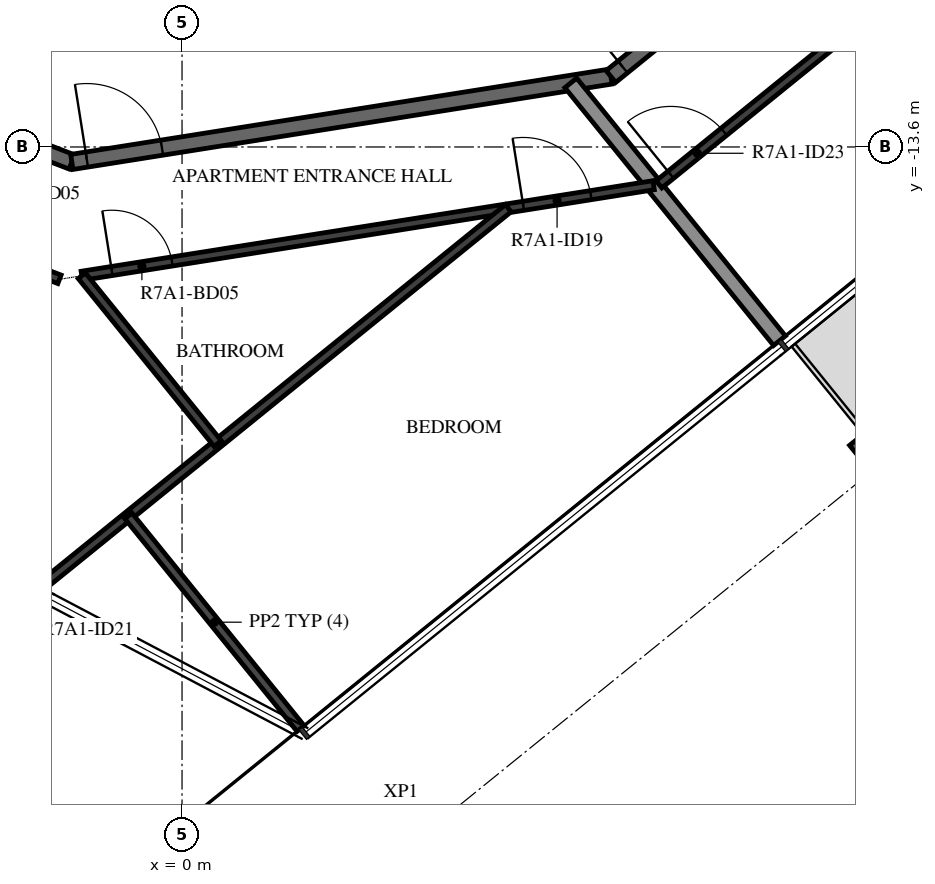
"""IFC4 building model, lengths in metres.
Left out: names, types, materials, properties, quantities, classifications, styles, units other than length and angle.
Written with IfcOpenShell. Run it as: python <this file> out.ifc"""

import sys

from ifc_helpers import new_model, si_unit, direction, frame, frame_2d, origin, origin_2d, place, context, subcontext, project, spatial, rectangle, i_section, extrude, element, fill, save


model = new_model("IFC4")
c1 = context("Model", 3, precision=1e-05, world=origin(), true_north=direction((0.0, 1.0)))
c2 = subcontext(c1, "Body", "Model", "MODEL_VIEW")
j1 = project(units=[si_unit("LENGTHUNIT", "METRE"), si_unit("PLANEANGLEUNIT", "RADIAN")], contexts=[c1])
p1 = place(None, origin())
s1 = spatial("IfcSite", under=j1, at=p1, CompositionType="ELEMENT")
p2 = place(p1, origin())
s2 = spatial("IfcBuilding", under=s1, at=p2, CompositionType="ELEMENT")
p3 = place(p2, frame((0.0, 0.0, 266.9)))
s3 = spatial("IfcBuildingStorey", under=s2, at=p3, CompositionType="ELEMENT", Elevation=266.9)
p4 = place(p3, frame((9.182, -17.781, -0.38), z_axis=(0.0, 0.0, 1.0), x_axis=(-0.777146167973, -0.629320136024, 0.0)))
e1 = element("IfcColumn", 1, at=p4, inside=s3, PredefinedType="COLUMN", context=c2, shape_type="SweptSolid", body=[
    extrude(i_section(OverallWidth=0.3, OverallDepth=0.9, WebThickness=0.019, FlangeThickness=0.035, FilletRadius=0.03, at=origin_2d()), origin(), (0.0, 0.0, 1.0), 3.5),
])
p5 = place(p3, frame((-8.154, -11.223, 0.0), z_axis=(0.0, 0.0, 1.0), x_axis=(0.93359073609, -0.358341090983, 0.0)))
e2 = element("IfcWall", 2, at=p5, inside=s3, PredefinedType="STANDARD", context=c2, shape_type="SweptSolid", body=[
    extrude(rectangle(XDim=7.181, YDim=0.2, at=frame_2d((3.59, 0.0))), origin(), (0.0, 0.0, 1.0), 3.12),
])
p6 = place(p5, frame((2.39, 0.0, 0.0)))
e3 = element("IfcOpeningElement", 3, at=p6, cuts=e2, PredefinedType="OPENING", context=c2, shape_type="SweptSolid", body=[
    extrude(rectangle(XDim=1.0, YDim=2.1, at=frame_2d((0.5, 1.05))), frame((0.0, 0.11, 0.0), z_axis=(0.0, -1.0, 0.0), x_axis=(1.0, 0.0, 0.0)), (0.0, 0.0, 1.0), 0.22),
])
p7 = place(p3, frame((-1.45, -13.797, 0.0), z_axis=(0.0, 0.0, 1.0), x_axis=(0.987690361611, 0.156421704315, 0.0)))
e4 = element("IfcWall", 4, at=p7, inside=s3, PredefinedType="STANDARD", context=c2, shape_type="SweptSolid", body=[
    extrude(rectangle(XDim=7.181, YDim=0.2, at=frame_2d((3.591, 0.0))), origin(), (0.0, 0.0, 1.0), 3.12),
])
p8 = place(p7, frame((0.2, 0.0, 0.0)))
e5 = element("IfcOpeningElement", 5, at=p8, cuts=e4, PredefinedType="OPENING", context=c2, shape_type="SweptSolid", body=[
    extrude(rectangle(XDim=1.0, YDim=2.1, at=frame_2d((0.5, 1.05))), frame((0.0, 0.11, 0.0), z_axis=(0.0, -1.0, 0.0), x_axis=(1.0, 0.0, 0.0)), (0.0, 0.0, 1.0), 0.22),
])
p9 = place(p3, frame((5.643, -12.673, 0.0), z_axis=(0.0, 0.0, 1.0), x_axis=(0.777160148113, 0.629302871585, 0.0)))
e6 = element("IfcWall", 6, at=p9, inside=s3, PredefinedType="STANDARD", context=c2, shape_type="SweptSolid", body=[
    extrude(rectangle(XDim=7.181, YDim=0.2, at=frame_2d((3.59, 0.0))), origin(), (0.0, 0.0, 1.0), 3.12),
])
p10 = place(p9, frame((0.2, 0.0, 0.0)))
e7 = element("IfcOpeningElement", 7, at=p10, cuts=e6, PredefinedType="OPENING", context=c2, shape_type="SweptSolid", body=[
    extrude(rectangle(XDim=1.0, YDim=2.1, at=frame_2d((0.5, 1.05))), frame((0.0, 0.11, 0.0), z_axis=(0.0, -1.0, 0.0), x_axis=(1.0, 0.0, 0.0)), (0.0, 0.0, 1.0), 0.22),
])
p11 = place(p3, frame((7.861, -16.148, 0.0), z_axis=(0.0, 0.0, 1.0), x_axis=(-0.629330189513, 0.777138026716, 0.0)))
e8 = element("IfcWall", 8, at=p11, inside=s3, PredefinedType="STANDARD", context=c2, shape_type="SweptSolid", body=[
    extrude(rectangle(XDim=4.364, YDim=0.2, at=frame_2d((2.182, 0.0))), origin(), (0.0, 0.0, 1.0), 2.73),
])
p12 = place(p3, frame((-9.067, -12.479, 0.0), z_axis=(0.0, 0.0, 1.0), x_axis=(0.933579449035, -0.358370495911, 0.0)))
e9 = element("IfcWall", 9, at=p12, inside=s3, PredefinedType="PARTITIONING", context=c2, shape_type="SweptSolid", body=[
    extrude(rectangle(XDim=7.985, YDim=0.12, at=frame_2d((3.992, 0.0))), origin(), (0.0, 0.0, 1.0), 3.12),
])
p13 = place(p12, frame((4.192, 0.0, 0.0)))
e10 = element("IfcOpeningElement", 10, at=p13, cuts=e9, PredefinedType="OPENING", context=c2, shape_type="SweptSolid", body=[
    extrude(rectangle(XDim=0.9, YDim=2.1, at=frame_2d((0.45, 1.05))), frame((0.0, 0.07, 0.0), z_axis=(0.0, -1.0, 0.0), x_axis=(1.0, 0.0, 0.0)), (0.0, 0.0, 1.0), 0.14),
])
p14 = place(p3, frame((-1.318, -15.294, 0.0), z_axis=(0.0, 0.0, 1.0), x_axis=(0.987689040792, 0.156430044108, 0.0)))
e11 = element("IfcWall", 11, at=p14, inside=s3, PredefinedType="PARTITIONING", context=c2, shape_type="SweptSolid", body=[
    extrude(rectangle(XDim=7.616, YDim=0.12, at=frame_2d((3.808, 0.0))), origin(), (0.0, 0.0, 1.0), 3.12),
])
p15 = place(p14, frame((0.4, 0.0, 0.0)))
e12 = element("IfcOpeningElement", 12, at=p15, cuts=e11, PredefinedType="OPENING", context=c2, shape_type="SweptSolid", body=[
    extrude(rectangle(XDim=0.8, YDim=2.1, at=frame_2d((0.4, 1.05))), frame((0.0, 0.07, 0.0), z_axis=(0.0, -1.0, 0.0), x_axis=(1.0, 0.0, 0.0)), (0.0, 0.0, 1.0), 0.14),
])
p16 = place(p14, frame((5.88, 0.0, 0.0)))
e13 = element("IfcOpeningElement", 13, at=p16, cuts=e11, PredefinedType="OPENING", context=c2, shape_type="SweptSolid", body=[
    extrude(rectangle(XDim=0.9, YDim=2.1, at=frame_2d((0.45, 1.05))), frame((0.0, 0.07, 0.0), z_axis=(0.0, -1.0, 0.0), x_axis=(1.0, 0.0, 0.0)), (0.0, 0.0, 1.0), 0.14),
])
p17 = place(p3, frame((-3.875, -21.019, 0.0), z_axis=(0.0, 0.0, 1.0), x_axis=(0.777149096542, 0.629316519523, 0.0)))
e14 = element("IfcWall", 14, at=p17, inside=s3, PredefinedType="PARTITIONING", context=c2, shape_type="SweptSolid", body=[
    extrude(rectangle(XDim=10.508, YDim=0.12, at=frame_2d((5.254, 0.0))), origin(), (0.0, 0.0, 1.0), 3.12),
])
p18 = place(p17, frame((1.23, 0.0, 0.0)))
e15 = element("IfcOpeningElement", 15, at=p18, cuts=e14, PredefinedType="OPENING", context=c2, shape_type="SweptSolid", body=[
    extrude(rectangle(XDim=0.9, YDim=2.1, at=frame_2d((0.45, 1.05))), frame((0.0, 0.07, 0.0), z_axis=(0.0, -1.0, 0.0), x_axis=(1.0, 0.0, 0.0)), (0.0, 0.0, 1.0), 0.14),
])
p19 = place(p3, frame((0.469, -17.502, 0.0), z_axis=(0.0, 0.0, 1.0), x_axis=(-0.629307025607, 0.777156784389, 0.0)))
e16 = element("IfcWall", 16, at=p19, inside=s3, PredefinedType="PARTITIONING", context=c2, shape_type="SweptSolid", body=[
    extrude(rectangle(XDim=2.84, YDim=0.12, at=frame_2d((1.42, 0.0))), origin(), (0.0, 0.0, 1.0), 3.12),
])
p20 = place(p3, frame((1.56, -21.251, 0.0), z_axis=(0.0, 0.0, 1.0), x_axis=(-0.62934843781, 0.7771232488, 0.0)))
e17 = element("IfcWall", 17, at=p20, inside=s3, PredefinedType="PARTITIONING", context=c2, shape_type="SweptSolid", body=[
    extrude(rectangle(XDim=3.6, YDim=0.12, at=frame_2d((1.8, 0.0))), origin(), (0.0, 0.0, 1.0), 2.73),
])
p21 = place(p3, frame((6.274, -14.092, 0.0), z_axis=(0.0, 0.0, 1.0), x_axis=(0.777135206268, 0.62933367237, 0.0)))
e18 = element("IfcWall", 18, at=p21, inside=s3, PredefinedType="PARTITIONING", context=c2, shape_type="SweptSolid", body=[
    extrude(rectangle(XDim=7.985, YDim=0.12, at=frame_2d((3.992, 0.0))), origin(), (0.0, 0.0, 1.0), 3.12),
])
p22 = place(p21, frame((0.2, 0.0, 0.0)))
e19 = element("IfcOpeningElement", 19, at=p22, cuts=e18, PredefinedType="OPENING", context=c2, shape_type="SweptSolid", body=[
    extrude(rectangle(XDim=0.9, YDim=2.1, at=frame_2d((0.45, 1.05))), frame((0.0, 0.07, 0.0), z_axis=(0.0, -1.0, 0.0), x_axis=(1.0, 0.0, 0.0)), (0.0, 0.0, 1.0), 0.14),
])
p23 = place(p8, origin())
e20 = element("IfcDoor", 20, at=p23, inside=s3, OperationType="SINGLE_SWING_LEFT", PredefinedType="DOOR", context=c2, shape_type="SweptSolid", body=[
    extrude(rectangle(XDim=1.0, YDim=2.1, at=frame_2d((0.5, 1.05))), frame((0.0, 0.025, 0.0), z_axis=(0.0, -1.0, 0.0), x_axis=(1.0, 0.0, 0.0)), (0.0, 0.0, 1.0), 0.05),
])
fill(e5, e20)
p24 = place(p15, origin())
e21 = element("IfcDoor", 21, at=p24, inside=s3, OperationType="SINGLE_SWING_LEFT", PredefinedType="DOOR", context=c2, shape_type="SweptSolid", body=[
    extrude(rectangle(XDim=0.8, YDim=2.1, at=frame_2d((0.4, 1.05))), frame((0.0, 0.025, 0.0), z_axis=(0.0, -1.0, 0.0), x_axis=(1.0, 0.0, 0.0)), (0.0, 0.0, 1.0), 0.05),
])
fill(e12, e21)
p25 = place(p16, origin())
e22 = element("IfcDoor", 22, at=p25, inside=s3, OperationType="SINGLE_SWING_LEFT", PredefinedType="DOOR", context=c2, shape_type="SweptSolid", body=[
    extrude(rectangle(XDim=0.9, YDim=2.1, at=frame_2d((0.45, 1.05))), frame((0.0, 0.025, 0.0), z_axis=(0.0, -1.0, 0.0), x_axis=(1.0, 0.0, 0.0)), (0.0, 0.0, 1.0), 0.05),
])
fill(e13, e22)
p26 = place(p10, origin())
e23 = element("IfcDoor", 23, at=p26, inside=s3, OperationType="SINGLE_SWING_LEFT", PredefinedType="DOOR", context=c2, shape_type="SweptSolid", body=[
    extrude(rectangle(XDim=1.0, YDim=2.1, at=frame_2d((0.5, 1.05))), frame((0.0, 0.025, 0.0), z_axis=(0.0, -1.0, 0.0), x_axis=(1.0, 0.0, 0.0)), (0.0, 0.0, 1.0), 0.05),
])
fill(e7, e23)
p27 = place(p22, origin())
e24 = element("IfcDoor", 24, at=p27, inside=s3, OperationType="SINGLE_SWING_LEFT", PredefinedType="DOOR", context=c2, shape_type="SweptSolid", body=[
    extrude(rectangle(XDim=0.9, YDim=2.1, at=frame_2d((0.45, 1.05))), frame((0.0, 0.025, 0.0), z_axis=(0.0, -1.0, 0.0), x_axis=(1.0, 0.0, 0.0)), (0.0, 0.0, 1.0), 0.05),
])
fill(e19, e24)
save(model, sys.argv[1])
